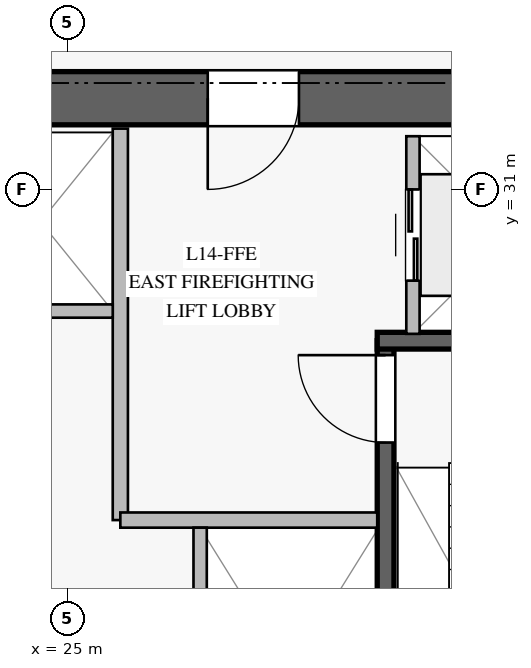
"""IFC4 building model, lengths in metres.
Left out: names, types, materials, properties, quantities, classifications, styles, units other than length and angle.
Written with IfcOpenShell. Run it as: python <this file> out.ifc"""

import sys

from ifc_helpers import new_model, si_unit, direction, frame, frame_2d, origin, place, context, subcontext, project, spatial, rectangle, extrude, element, fill, save


model = new_model("IFC4")
c1 = context("Model", 3, precision=1e-05, world=origin(), true_north=direction((0.0, 1.0)))
c2 = subcontext(c1, "Body", "Model", "MODEL_VIEW")
j1 = project(units=[si_unit("LENGTHUNIT", "METRE"), si_unit("PLANEANGLEUNIT", "RADIAN")], contexts=[c1])
p1 = place(None, origin())
s1 = spatial("IfcSite", under=j1, at=p1, CompositionType="ELEMENT")
p2 = place(p1, origin())
s2 = spatial("IfcBuilding", under=s1, at=p2, CompositionType="ELEMENT")
p3 = place(p2, frame((0.0, 0.0, 60.0)))
s3 = spatial("IfcBuildingStorey", under=s2, at=p3, CompositionType="ELEMENT", Elevation=60.0)
p4 = place(p3, frame((33.15, 32.2, 0.0), z_axis=(0.0, 0.0, 1.0), x_axis=(-1.0, 0.0, 0.0)))
e1 = element("IfcWall", 1, at=p4, inside=s3, PredefinedType="SHEAR", context=c2, shape_type="SweptSolid", body=[
    extrude(rectangle(XDim=16.3, YDim=0.7, at=frame_2d((8.15, 0.0))), origin(), (0.0, 0.0, 1.0), 3.76),
])
p5 = place(p4, frame((5.1, 0.0, 0.0)))
e2 = element("IfcOpeningElement", 2, at=p5, cuts=e1, PredefinedType="OPENING", context=c2, shape_type="SweptSolid", body=[
    extrude(rectangle(XDim=1.2, YDim=2.25, at=frame_2d((0.6, 1.125))), frame((0.0, 0.36, 0.0), z_axis=(0.0, -1.0, 0.0), x_axis=(1.0, 0.0, 0.0)), (0.0, 0.0, 1.0), 0.72),
])
p6 = place(p3, frame((29.19, 21.79, 0.0), z_axis=(0.0, 0.0, 1.0), x_axis=(0.0, 1.0, 0.0)))
e3 = element("IfcWall", 3, at=p6, inside=s3, PredefinedType="SOLIDWALL", context=c2, shape_type="SweptSolid", body=[
    extrude(rectangle(XDim=7.22, YDim=0.22, at=frame_2d((3.61, 0.0))), origin(), (0.0, 0.0, 1.0), 3.76),
])
p7 = place(p6, frame((5.88, 0.0, 0.0)))
e4 = element("IfcOpeningElement", 4, at=p7, cuts=e3, PredefinedType="OPENING", context=c2, shape_type="SweptSolid", body=[
    extrude(rectangle(XDim=1.15, YDim=2.2, at=frame_2d((0.575, 1.1))), frame((0.0, 0.12, 0.0), z_axis=(0.0, -1.0, 0.0), x_axis=(1.0, 0.0, 0.0)), (0.0, 0.0, 1.0), 0.24),
])
p8 = place(p3, frame((29.08, 29.01, 0.0), z_axis=(0.0, 0.0, 1.0), x_axis=(1.0, 0.0, 0.0)))
e5 = element("IfcWall", 5, at=p8, inside=s3, PredefinedType="SOLIDWALL", context=c2, shape_type="SweptSolid", body=[
    extrude(rectangle(XDim=3.72, YDim=0.22, at=frame_2d((1.86, 0.0))), origin(), (0.0, 0.0, 1.0), 3.76),
])
p9 = place(p3, frame((25.7, 26.65, 0.0), z_axis=(0.0, 0.0, 1.0), x_axis=(0.0, 1.0, 0.0)))
e6 = element("IfcWall", 6, at=p9, inside=s3, PredefinedType="PARTITIONING", context=c2, shape_type="SweptSolid", body=[
    extrude(rectangle(XDim=5.15, YDim=0.2, at=frame_2d((2.575, 0.0))), origin(), (0.0, 0.0, 1.0), 3.76),
])
p10 = place(p3, frame((25.7, 26.65, 0.0), z_axis=(0.0, 0.0, 1.0), x_axis=(1.0, 0.0, 0.0)))
e7 = element("IfcWall", 7, at=p10, inside=s3, PredefinedType="PARTITIONING", context=c2, shape_type="SweptSolid", body=[
    extrude(rectangle(XDim=3.38, YDim=0.2, at=frame_2d((1.69, 0.0))), origin(), (0.0, 0.0, 1.0), 3.76),
])
for number, where, z_axis, x_axis in (
    (8, (23.7, 29.4, 0.0), (0.0, 0.0, 1.0), (1.0, 0.0, 0.0)),
    (9, (26.75, 24.65, 0.0), (0.0, 0.0, 1.0), (0.0, 1.0, 0.0)),
):
    element("IfcWall", number, at=place(p3, frame(where, z_axis=z_axis, x_axis=x_axis)), inside=s3, PredefinedType="PARTITIONING", context=c2, shape_type="SweptSolid", body=[
        extrude(rectangle(XDim=1.9, YDim=0.175, at=frame_2d((0.95, 0.0))), origin(), (0.0, 0.0, 1.0), 3.76),
    ])
p11 = place(p3, frame((29.55, 29.1, 0.0), z_axis=(0.0, 0.0, 1.0), x_axis=(0.0, 1.0, 0.0)))
e10 = element("IfcWall", 10, at=p11, inside=s3, PredefinedType="PARTITIONING", context=c2, shape_type="SweptSolid", body=[
    extrude(rectangle(XDim=2.6, YDim=0.175, at=frame_2d((1.3, 0.0))), origin(), (0.0, 0.0, 1.0), 3.76),
])
p12 = place(p11, frame((0.7, 0.0, 0.0)))
e11 = element("IfcOpeningElement", 11, at=p12, cuts=e10, PredefinedType="OPENING", context=c2, shape_type="SweptSolid", body=[
    extrude(rectangle(XDim=1.2, YDim=2.2, at=frame_2d((0.6, 1.1))), frame((0.0, 0.098, 0.0), z_axis=(0.0, -1.0, 0.0), x_axis=(1.0, 0.0, 0.0)), (0.0, 0.0, 1.0), 0.195),
])
p13 = place(p7, origin())
e12 = element("IfcDoor", 12, at=p13, inside=s3, OperationType="SINGLE_SWING_RIGHT", PredefinedType="DOOR", context=c2, shape_type="SweptSolid", body=[
    extrude(rectangle(XDim=1.15, YDim=2.2, at=frame_2d((0.575, 1.1))), frame((0.0, 0.025, 0.0), z_axis=(0.0, -1.0, 0.0), x_axis=(1.0, 0.0, 0.0)), (0.0, 0.0, 1.0), 0.05),
])
fill(e4, e12)
p14 = place(p5, origin())
e13 = element("IfcDoor", 13, at=p14, inside=s3, OperationType="SINGLE_SWING_RIGHT", PredefinedType="DOOR", context=c2, shape_type="SweptSolid", body=[
    extrude(rectangle(XDim=1.2, YDim=2.25, at=frame_2d((0.6, 1.125))), frame((0.0, 0.025, 0.0), z_axis=(0.0, -1.0, 0.0), x_axis=(1.0, 0.0, 0.0)), (0.0, 0.0, 1.0), 0.05),
])
fill(e2, e13)
p15 = place(p12, origin())
e14 = element("IfcDoor", 14, at=p15, inside=s3, OperationType="DOUBLE_DOOR_SLIDING", PredefinedType="DOOR", context=c2, shape_type="SweptSolid", body=[
    extrude(rectangle(XDim=1.2, YDim=2.2, at=frame_2d((0.6, 1.1))), frame((0.0, 0.025, 0.0), z_axis=(0.0, -1.0, 0.0), x_axis=(1.0, 0.0, 0.0)), (0.0, 0.0, 1.0), 0.05),
])
fill(e11, e14)
save(model, sys.argv[1])
